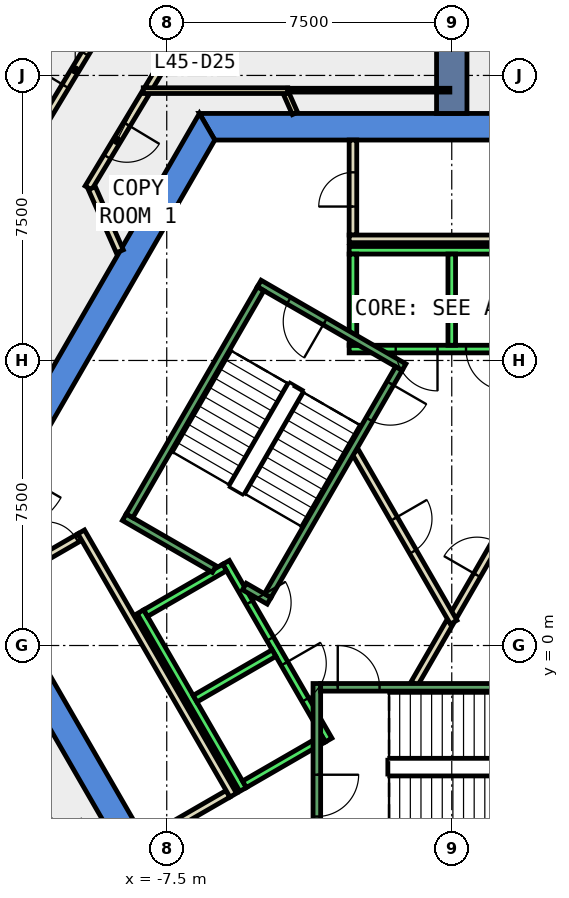
"""IFC4 building model, lengths in metres.
Left out: names, types, materials, properties, quantities, classifications, styles, units other than length and angle.
Written with IfcOpenShell. Run it as: python <this file> out.ifc"""

import sys

from ifc_helpers import new_model, si_unit, direction, frame, frame_2d, origin, place, context, subcontext, project, spatial, polyline, rectangle, outline, extrude, element, fill, save


model = new_model("IFC4")
c1 = context("Model", 3, precision=1e-05, world=origin(), true_north=direction((0.0, 1.0)))
c2 = subcontext(c1, "Body", "Model", "MODEL_VIEW")
j1 = project(units=[si_unit("LENGTHUNIT", "METRE"), si_unit("PLANEANGLEUNIT", "RADIAN")], contexts=[c1])
p1 = place(None, origin())
s1 = spatial("IfcSite", under=j1, at=p1, CompositionType="ELEMENT")
p2 = place(p1, origin())
s2 = spatial("IfcBuilding", under=s1, at=p2, CompositionType="ELEMENT")
p3 = place(p2, frame((0.0, 0.0, 202.4)))
s3 = spatial("IfcBuildingStorey", under=s2, at=p3, CompositionType="ELEMENT", Elevation=202.4)
p4 = place(p3, frame((0.0, 0.0, -0.4)))
e1 = element("IfcWall", 1, at=p4, inside=s3, PredefinedType="SHEAR", context=c2, shape_type="SweptSolid", body=[
    extrude(outline(polyline([(6.64, 14.0), (-6.64, 14.0), (-6.235, 13.3), (6.235, 13.3), (6.64, 14.0)])), origin(), (0.0, 0.0, 1.0), 4.2),
])
p5 = place(p3, frame((0.0, 0.0, -0.4)))
e2 = element("IfcWall", 2, at=p5, inside=s3, PredefinedType="SHEAR", context=c2, shape_type="SweptSolid", body=[
    extrude(outline(polyline([(-11.834, 5.002), (-11.228, 4.652), (-6.235, 13.3), (-6.64, 14.0), (-11.834, 5.002)])), origin(), (0.0, 0.0, 1.0), 4.2),
])
p6 = place(p3, frame((0.0, 0.0, -0.4)))
e3 = element("IfcWall", 3, at=p6, inside=s3, PredefinedType="SHEAR", context=c2, shape_type="SweptSolid", body=[
    extrude(outline(polyline([(-13.279, 2.5), (-6.64, -9.0), (-6.235, -8.3), (-12.471, 2.5), (-13.279, 2.5)])), origin(), (0.0, 0.0, 1.0), 4.2),
])
p7 = place(p3, frame((0.0, 14.0, -0.4), z_axis=(0.0, 0.0, 1.0), x_axis=(0.0, 1.0, 0.0)))
e4 = element("IfcWall", 4, at=p7, inside=s3, PredefinedType="SHEAR", context=c2, shape_type="SweptSolid", body=[
    extrude(rectangle(XDim=9.0, YDim=0.8, at=frame_2d((4.5, 0.0))), origin(), (0.0, 0.0, 1.0), 4.2),
])
p8 = place(p3, frame((-8.057, 14.536, 0.0), z_axis=(0.0, 0.0, 1.0), x_axis=(-0.516268010323, -0.856427078926, 0.0)))
e5 = element("IfcWall", 5, at=p8, inside=s3, PredefinedType="PARTITIONING", context=c2, shape_type="SweptSolid", body=[
    extrude(rectangle(XDim=2.915, YDim=0.2, at=frame_2d((1.458, 0.0))), origin(), (0.0, 0.0, 1.0), 3.8),
])
p9 = place(p8, frame((0.958, 0.0, 0.0)))
e6 = element("IfcOpeningElement", 6, at=p9, cuts=e5, PredefinedType="OPENING", context=c2, shape_type="SweptSolid", body=[
    extrude(rectangle(XDim=1.0, YDim=2.1, at=frame_2d((0.5, 1.05))), frame((0.0, 0.11, 0.0), z_axis=(0.0, -1.0, 0.0), x_axis=(1.0, 0.0, 0.0)), (0.0, 0.0, 1.0), 0.22),
])
p10 = place(p3, frame((-9.47, 12.033, 0.0), z_axis=(0.0, 0.0, 1.0), x_axis=(0.40441741061, -0.914574522931, 0.0)))
e7 = element("IfcWall", 7, at=p10, inside=s3, PredefinedType="PARTITIONING", context=c2, shape_type="SweptSolid", body=[
    extrude(rectangle(XDim=1.817, YDim=0.2, at=frame_2d((0.909, 0.0))), origin(), (0.0, 0.0, 1.0), 3.8),
])
p11 = place(p3, frame((-6.213, 17.595, 0.0), z_axis=(0.0, 0.0, 1.0), x_axis=(-0.516121112316, -0.856515614231, 0.0)))
e8 = element("IfcWall", 8, at=p11, inside=s3, PredefinedType="PARTITIONING", context=c2, shape_type="SweptSolid", body=[
    extrude(rectangle(XDim=3.422, YDim=0.2, at=frame_2d((1.711, 0.0))), origin(), (0.0, 0.0, 1.0), 3.8),
])
p12 = place(p3, frame((-12.025, 11.633, 0.0), z_axis=(0.0, 0.0, 1.0), x_axis=(0.516283129542, 0.856417964636, 0.0)))
e9 = element("IfcWall", 9, at=p12, inside=s3, PredefinedType="PARTITIONING", context=c2, shape_type="SweptSolid", body=[
    extrude(rectangle(XDim=8.05, YDim=0.2, at=frame_2d((4.025, 0.0))), origin(), (0.0, 0.0, 1.0), 3.8),
])
p13 = place(p12, frame((3.6, 0.0, 0.0)))
e10 = element("IfcOpeningElement", 10, at=p13, cuts=e9, PredefinedType="OPENING", context=c2, shape_type="SweptSolid", body=[
    extrude(rectangle(XDim=1.0, YDim=2.1, at=frame_2d((0.5, 1.05))), frame((0.0, 0.11, 0.0), z_axis=(0.0, -1.0, 0.0), x_axis=(1.0, 0.0, 0.0)), (0.0, 0.0, 1.0), 0.22),
])
p14 = place(p3, frame((-2.6, 10.8, 0.0), z_axis=(0.0, 0.0, 1.0), x_axis=(0.0, 1.0, 0.0)))
e11 = element("IfcWall", 11, at=p14, inside=s3, PredefinedType="PARTITIONING", context=c2, shape_type="SweptSolid", body=[
    extrude(rectangle(XDim=2.5, YDim=0.2, at=frame_2d((1.25, 0.0))), origin(), (0.0, 0.0, 1.0), 3.8),
])
p15 = place(p14, frame((0.75, 0.0, 0.0)))
e12 = element("IfcOpeningElement", 12, at=p15, cuts=e11, PredefinedType="OPENING", context=c2, shape_type="SweptSolid", body=[
    extrude(rectangle(XDim=0.9, YDim=2.1, at=frame_2d((0.45, 1.05))), frame((0.0, 0.11, 0.0), z_axis=(0.0, -1.0, 0.0), x_axis=(1.0, 0.0, 0.0)), (0.0, 0.0, 1.0), 0.22),
])
p16 = place(p3, frame((2.7, 10.7, 0.0), z_axis=(0.0, 0.0, 1.0), x_axis=(-1.0, 0.0, 0.0)))
e13 = element("IfcWall", 13, at=p16, inside=s3, PredefinedType="PARTITIONING", context=c2, shape_type="SweptSolid", body=[
    extrude(rectangle(XDim=5.4, YDim=0.2, at=frame_2d((2.7, 0.0))), origin(), (0.0, 0.0, 1.0), 3.8),
])
p17 = place(p3, frame((-5.888, -3.902, 0.0), z_axis=(0.0, 0.0, 1.0), x_axis=(-0.866022959057, -0.500004234368, 0.0)))
e14 = element("IfcWall", 14, at=p17, inside=s3, PredefinedType="PARTITIONING", context=c2, shape_type="SweptSolid", body=[
    extrude(rectangle(XDim=2.5, YDim=0.2, at=frame_2d((1.25, 0.0))), origin(), (0.0, 0.0, 1.0), 3.8),
])
p18 = place(p3, frame((-11.953, 1.603, 0.0), z_axis=(0.0, 0.0, 1.0), x_axis=(0.865998541277, 0.500046524342, 0.0)))
e15 = element("IfcWall", 15, at=p18, inside=s3, PredefinedType="PARTITIONING", context=c2, shape_type="SweptSolid", body=[
    extrude(rectangle(XDim=2.5, YDim=0.2, at=frame_2d((1.25, 0.0))), origin(), (0.0, 0.0, 1.0), 3.8),
])
p19 = place(p18, frame((1.5, 0.0, 0.0)))
e16 = element("IfcOpeningElement", 16, at=p19, cuts=e15, PredefinedType="OPENING", context=c2, shape_type="SweptSolid", body=[
    extrude(rectangle(XDim=0.9, YDim=2.1, at=frame_2d((0.45, 1.05))), frame((0.0, 0.11, 0.0), z_axis=(0.0, -1.0, 0.0), x_axis=(1.0, 0.0, 0.0)), (0.0, 0.0, 1.0), 0.22),
])
p20 = place(p3, frame((-9.751, 2.99, 0.0), z_axis=(0.0, 0.0, 1.0), x_axis=(0.500012163284, -0.866018381195, 0.0)))
e17 = element("IfcWall", 17, at=p20, inside=s3, PredefinedType="PARTITIONING", context=c2, shape_type="SweptSolid", body=[
    extrude(rectangle(XDim=8.0, YDim=0.2, at=frame_2d((4.0, 0.0))), origin(), (0.0, 0.0, 1.0), 3.8),
])
p21 = place(p3, frame((-4.125, 14.0, 0.0), z_axis=(0.0, 0.0, 1.0), x_axis=(-0.404850841056, 0.914382740703, 0.0)))
e18 = element("IfcWall", 18, at=p21, inside=s3, PredefinedType="PARTITIONING", context=c2, shape_type="SweptSolid", body=[
    extrude(rectangle(XDim=0.581, YDim=0.15, at=frame_2d((0.291, 0.0))), origin(), (0.0, 0.0, 1.0), 3.8),
])
p22 = place(p3, frame((-4.316, 14.6, 0.0), z_axis=(0.0, 0.0, 1.0), x_axis=(-1.0, 0.0, 0.0)))
e19 = element("IfcWall", 19, at=p22, inside=s3, PredefinedType="PARTITIONING", context=c2, shape_type="SweptSolid", body=[
    extrude(rectangle(XDim=3.802, YDim=0.15, at=frame_2d((1.901, 0.0))), origin(), (0.0, 0.0, 1.0), 3.8),
])
p23 = place(p3, frame((-0.982, -1.0, 0.0), z_axis=(0.0, 0.0, 1.0), x_axis=(0.50024047865, 0.865886518847, 0.0)))
e20 = element("IfcWall", 20, at=p23, inside=s3, PredefinedType="PARTITIONING", context=c2, shape_type="SweptSolid", body=[
    extrude(rectangle(XDim=1.863, YDim=0.2, at=frame_2d((0.931, 0.0))), origin(), (0.0, 0.0, 1.0), 3.8),
])
p24 = place(p3, frame((0.05, 0.787, 0.0), z_axis=(0.0, 0.0, 1.0), x_axis=(0.499954076797, 0.866051915934, 0.0)))
e21 = element("IfcWall", 21, at=p24, inside=s3, PredefinedType="PARTITIONING", context=c2, shape_type="SweptSolid", body=[
    extrude(rectangle(XDim=3.558, YDim=0.2, at=frame_2d((1.779, 0.0))), origin(), (0.0, 0.0, 1.0), 3.8),
])
p25 = place(p24, frame((1.229, 0.0, 0.0)))
e22 = element("IfcOpeningElement", 22, at=p25, cuts=e21, PredefinedType="OPENING", context=c2, shape_type="SweptSolid", body=[
    extrude(rectangle(XDim=1.0, YDim=2.1, at=frame_2d((0.5, 1.05))), frame((0.0, 0.11, 0.0), z_axis=(0.0, -1.0, 0.0), x_axis=(1.0, 0.0, 0.0)), (0.0, 0.0, 1.0), 0.22),
])
p26 = place(p3, frame((-2.54, 5.1, 0.0), z_axis=(0.0, 0.0, 1.0), x_axis=(0.499925051871, -0.866068670783, 0.0)))
e23 = element("IfcWall", 23, at=p26, inside=s3, PredefinedType="PARTITIONING", context=c2, shape_type="SweptSolid", body=[
    extrude(rectangle(XDim=5.181, YDim=0.2, at=frame_2d((2.59, 0.0))), origin(), (0.0, 0.0, 1.0), 3.8),
])
p27 = place(p26, frame((2.04, 0.0, 0.0)))
e24 = element("IfcOpeningElement", 24, at=p27, cuts=e23, PredefinedType="OPENING", context=c2, shape_type="SweptSolid", body=[
    extrude(rectangle(XDim=1.0, YDim=2.1, at=frame_2d((0.5, 1.05))), frame((0.0, 0.11, 0.0), z_axis=(0.0, -1.0, 0.0), x_axis=(1.0, 0.0, 0.0)), (0.0, 0.0, 1.0), 0.22),
])
p28 = place(p3, frame((-4.316, 14.612, 0.0), z_axis=(0.0, 0.0, 1.0), x_axis=(1.0, 0.0, 0.0)))
e25 = element("IfcWall", 25, at=p28, inside=s3, PredefinedType="PARTITIONING", context=c2, shape_type="SweptSolid", body=[
    extrude(rectangle(XDim=4.266, YDim=0.1, at=frame_2d((2.133, 0.0))), origin(), (0.0, 0.0, 1.0), 3.8),
])
p29 = place(p3, frame((-10.173, -5.069, 0.0), z_axis=(0.0, 0.0, 1.0), x_axis=(-0.725908697087, 0.687791075468, 0.0)))
e26 = element("IfcWall", 26, at=p29, inside=s3, PredefinedType="PARTITIONING", context=c2, shape_type="SweptSolid", body=[
    extrude(rectangle(XDim=8.313, YDim=0.2, at=frame_2d((4.157, 0.0))), origin(), (0.0, 0.0, 1.0), 3.8),
])
p30 = place(p3, frame((2.7, 7.8, 0.0), z_axis=(0.0, 0.0, 1.0), x_axis=(-1.0, 0.0, 0.0)))
e27 = element("IfcWall", 27, at=p30, inside=s3, PredefinedType="STANDARD", context=c2, shape_type="SweptSolid", body=[
    extrude(rectangle(XDim=5.4, YDim=0.2, at=frame_2d((2.7, 0.0))), origin(), (0.0, 0.0, 1.0), 3.8),
])
p31 = place(p30, frame((1.225, 0.0, 0.0)))
e28 = element("IfcOpeningElement", 28, at=p31, cuts=e27, PredefinedType="OPENING", context=c2, shape_type="SweptSolid", body=[
    extrude(rectangle(XDim=1.1, YDim=2.1, at=frame_2d((0.55, 1.05))), frame((0.0, 0.11, 0.0), z_axis=(0.0, -1.0, 0.0), x_axis=(1.0, 0.0, 0.0)), (0.0, 0.0, 1.0), 0.22),
])
p32 = place(p30, frame((3.075, 0.0, 0.0)))
e29 = element("IfcOpeningElement", 29, at=p32, cuts=e27, PredefinedType="OPENING", context=c2, shape_type="SweptSolid", body=[
    extrude(rectangle(XDim=1.1, YDim=2.1, at=frame_2d((0.55, 1.05))), frame((0.0, 0.11, 0.0), z_axis=(0.0, -1.0, 0.0), x_axis=(1.0, 0.0, 0.0)), (0.0, 0.0, 1.0), 0.22),
])
p33 = place(p3, frame((2.7, 10.4, 0.0), z_axis=(0.0, 0.0, 1.0), x_axis=(-1.0, 0.0, 0.0)))
e30 = element("IfcWall", 30, at=p33, inside=s3, PredefinedType="STANDARD", context=c2, shape_type="SweptSolid", body=[
    extrude(rectangle(XDim=5.4, YDim=0.2, at=frame_2d((2.7, 0.0))), origin(), (0.0, 0.0, 1.0), 3.8),
])
for number, where, z_axis, x_axis in (
    (31, (0.0, 7.9, 0.0), (0.0, 0.0, 1.0), (0.0, 1.0, 0.0)),
    (32, (-2.6, 7.9, 0.0), (0.0, 0.0, 1.0), (0.0, 1.0, 0.0)),
):
    element("IfcWall", number, at=place(p3, frame(where, z_axis=z_axis, x_axis=x_axis)), inside=s3, PredefinedType="STANDARD", context=c2, shape_type="SweptSolid", body=[
        extrude(rectangle(XDim=2.4, YDim=0.2, at=frame_2d((1.2, 0.0))), origin(), (0.0, 0.0, 1.0), 3.8),
    ])
p34 = place(p3, frame((-5.94, 2.188, 0.0), z_axis=(0.0, 0.0, 1.0), x_axis=(0.500034260056, -0.866005622828, 0.0)))
e33 = element("IfcWall", 33, at=p34, inside=s3, PredefinedType="STANDARD", context=c2, shape_type="SweptSolid", body=[
    extrude(rectangle(XDim=5.399, YDim=0.2, at=frame_2d((2.7, 0.0))), origin(), (0.0, 0.0, 1.0), 3.8),
])
p35 = place(p34, frame((3.075, 0.0, 0.0)))
e34 = element("IfcOpeningElement", 34, at=p35, cuts=e33, PredefinedType="OPENING", context=c2, shape_type="SweptSolid", body=[
    extrude(rectangle(XDim=1.1, YDim=2.1, at=frame_2d((0.55, 1.05))), frame((0.0, 0.11, 0.0), z_axis=(0.0, -1.0, 0.0), x_axis=(1.0, 0.0, 0.0)), (0.0, 0.0, 1.0), 0.22),
])
p36 = place(p34, frame((1.225, 0.0, 0.0)))
e35 = element("IfcOpeningElement", 35, at=p36, cuts=e33, PredefinedType="OPENING", context=c2, shape_type="SweptSolid", body=[
    extrude(rectangle(XDim=1.1, YDim=2.1, at=frame_2d((0.55, 1.05))), frame((0.0, 0.11, 0.0), z_axis=(0.0, -1.0, 0.0), x_axis=(1.0, 0.0, 0.0)), (0.0, 0.0, 1.0), 0.22),
])
p37 = place(p3, frame((-8.192, 0.888, 0.0), z_axis=(0.0, 0.0, 1.0), x_axis=(0.500034260056, -0.866005622828, 0.0)))
e36 = element("IfcWall", 36, at=p37, inside=s3, PredefinedType="STANDARD", context=c2, shape_type="SweptSolid", body=[
    extrude(rectangle(XDim=5.399, YDim=0.2, at=frame_2d((2.7, 0.0))), origin(), (0.0, 0.0, 1.0), 3.8),
])
for number, where, z_axis, x_axis in (
    (37, (-5.977, 2.052, 0.0), (0.0, 0.0, 1.0), (-0.866, -0.5, 0.0)),
    (38, (-4.677, -0.2, 0.0), (0.0, 0.0, 1.0), (-0.866, -0.5, 0.0)),
):
    element("IfcWall", number, at=place(p3, frame(where, z_axis=z_axis, x_axis=x_axis)), inside=s3, PredefinedType="STANDARD", context=c2, shape_type="SweptSolid", body=[
        extrude(rectangle(XDim=2.399, YDim=0.2, at=frame_2d((1.2, 0.0))), origin(), (0.0, 0.0, 1.0), 3.8),
    ])
p38 = place(p3, frame((-3.377, -2.452, 0.0), z_axis=(0.0, 0.0, 1.0), x_axis=(-0.865955154139, -0.50012165622, 0.0)))
e39 = element("IfcWall", 39, at=p38, inside=s3, PredefinedType="STANDARD", context=c2, shape_type="SweptSolid", body=[
    extrude(rectangle(XDim=2.4, YDim=0.2, at=frame_2d((1.2, 0.0))), origin(), (0.0, 0.0, 1.0), 3.8),
])
p39 = place(p3, frame((-3.55, -1.0, 0.0), z_axis=(0.0, 0.0, 1.0), x_axis=(0.0, -1.0, 0.0)))
e40 = element("IfcWall", 40, at=p39, inside=s3, PredefinedType="STANDARD", context=c2, shape_type="SweptSolid", body=[
    extrude(rectangle(XDim=4.4, YDim=0.2, at=frame_2d((2.2, 0.0))), origin(), (0.0, 0.0, 1.0), 3.8),
])
p40 = place(p39, frame((2.4, 0.0, 0.0)))
e41 = element("IfcOpeningElement", 41, at=p40, cuts=e40, PredefinedType="OPENING", context=c2, shape_type="SweptSolid", body=[
    extrude(rectangle(XDim=1.1, YDim=2.2, at=frame_2d((0.55, 1.1))), frame((0.0, 0.11, 0.0), z_axis=(0.0, -1.0, 0.0), x_axis=(1.0, 0.0, 0.0)), (0.0, 0.0, 1.0), 0.22),
])
p41 = place(p3, frame((-3.45, -1.1, 0.0), z_axis=(0.0, 0.0, 1.0), x_axis=(1.0, 0.0, 0.0)))
e42 = element("IfcWall", 42, at=p41, inside=s3, PredefinedType="STANDARD", context=c2, shape_type="SweptSolid", body=[
    extrude(rectangle(XDim=6.9, YDim=0.2, at=frame_2d((3.45, 0.0))), origin(), (0.0, 0.0, 1.0), 3.8),
])
p42 = place(p41, frame((0.45, 0.0, 0.0)))
e43 = element("IfcOpeningElement", 43, at=p42, cuts=e42, PredefinedType="OPENING", context=c2, shape_type="SweptSolid", body=[
    extrude(rectangle(XDim=1.1, YDim=2.2, at=frame_2d((0.55, 1.1))), frame((0.0, 0.11, 0.0), z_axis=(0.0, -1.0, 0.0), x_axis=(1.0, 0.0, 0.0)), (0.0, 0.0, 1.0), 0.22),
])
p43 = place(p3, frame((-1.256, 7.324, 0.0), z_axis=(0.0, 0.0, 1.0), x_axis=(-0.866046073146, 0.499964197906, 0.0)))
e44 = element("IfcWall", 44, at=p43, inside=s3, PredefinedType="STANDARD", context=c2, shape_type="SweptSolid", body=[
    extrude(rectangle(XDim=4.4, YDim=0.2, at=frame_2d((2.2, 0.0))), origin(), (0.0, 0.0, 1.0), 3.8),
])
p44 = place(p43, frame((2.4, 0.0, 0.0)))
e45 = element("IfcOpeningElement", 45, at=p44, cuts=e44, PredefinedType="OPENING", context=c2, shape_type="SweptSolid", body=[
    extrude(rectangle(XDim=1.1, YDim=2.2, at=frame_2d((0.55, 1.1))), frame((0.0, 0.11, 0.0), z_axis=(0.0, -1.0, 0.0), x_axis=(1.0, 0.0, 0.0)), (0.0, 0.0, 1.0), 0.22),
])
p45 = place(p3, frame((-6.25, 2.01, 0.0), z_axis=(0.0, 0.0, 1.0), x_axis=(-0.86611865017, 0.499838457731, 0.0)))
e46 = element("IfcWall", 46, at=p45, inside=s3, PredefinedType="STANDARD", context=c2, shape_type="SweptSolid", body=[
    extrude(rectangle(XDim=2.733, YDim=0.2, at=frame_2d((1.366, 0.0))), origin(), (0.0, 0.0, 1.0), 3.8),
])
p46 = place(p3, frame((-4.806, 1.176, 0.0), z_axis=(0.0, 0.0, 1.0), x_axis=(-0.866558586415, 0.499075361355, 0.0)))
e47 = element("IfcWall", 47, at=p46, inside=s3, PredefinedType="STANDARD", context=c2, shape_type="SweptSolid", body=[
    extrude(rectangle(XDim=0.751, YDim=0.2, at=frame_2d((0.376, 0.0))), origin(), (0.0, 0.0, 1.0), 3.8),
])
p47 = place(p3, frame((-1.393, 7.288, 0.0), z_axis=(0.0, 0.0, 1.0), x_axis=(-0.499963383562, -0.866046543262, 0.0)))
e48 = element("IfcWall", 48, at=p47, inside=s3, PredefinedType="STANDARD", context=c2, shape_type="SweptSolid", body=[
    extrude(rectangle(XDim=6.9, YDim=0.2, at=frame_2d((3.45, 0.0))), origin(), (0.0, 0.0, 1.0), 3.8),
])
p48 = place(p47, frame((0.45, 0.0, 0.0)))
e49 = element("IfcOpeningElement", 49, at=p48, cuts=e48, PredefinedType="OPENING", context=c2, shape_type="SweptSolid", body=[
    extrude(rectangle(XDim=1.1, YDim=2.2, at=frame_2d((0.55, 1.1))), frame((0.0, 0.11, 0.0), z_axis=(0.0, -1.0, 0.0), x_axis=(1.0, 0.0, 0.0)), (0.0, 0.0, 1.0), 0.22),
])
p49 = place(p3, frame((-5.03, 9.388, 0.0), z_axis=(0.0, 0.0, 1.0), x_axis=(-0.499978703459, -0.866037698999, 0.0)))
e50 = element("IfcWall", 50, at=p49, inside=s3, PredefinedType="STANDARD", context=c2, shape_type="SweptSolid", body=[
    extrude(rectangle(XDim=6.9, YDim=0.2, at=frame_2d((3.45, 0.0))), origin(), (0.0, 0.0, 1.0), 3.8),
])
p50 = place(p13, origin())
e51 = element("IfcDoor", 51, at=p50, inside=s3, OperationType="SINGLE_SWING_LEFT", PredefinedType="DOOR", context=c2, shape_type="SweptSolid", body=[
    extrude(rectangle(XDim=1.0, YDim=2.1, at=frame_2d((0.5, 1.05))), frame((0.0, 0.025, 0.0), z_axis=(0.0, -1.0, 0.0), x_axis=(1.0, 0.0, 0.0)), (0.0, 0.0, 1.0), 0.05),
])
fill(e10, e51)
p51 = place(p9, origin())
e52 = element("IfcDoor", 52, at=p51, inside=s3, OperationType="SINGLE_SWING_LEFT", PredefinedType="DOOR", context=c2, shape_type="SweptSolid", body=[
    extrude(rectangle(XDim=1.0, YDim=2.1, at=frame_2d((0.5, 1.05))), frame((0.0, 0.025, 0.0), z_axis=(0.0, -1.0, 0.0), x_axis=(1.0, 0.0, 0.0)), (0.0, 0.0, 1.0), 0.05),
])
fill(e6, e52)
p52 = place(p25, origin())
e53 = element("IfcDoor", 53, at=p52, inside=s3, OperationType="SINGLE_SWING_RIGHT", PredefinedType="DOOR", context=c2, shape_type="SweptSolid", body=[
    extrude(rectangle(XDim=1.0, YDim=2.1, at=frame_2d((0.5, 1.05))), frame((0.0, 0.025, 0.0), z_axis=(0.0, -1.0, 0.0), x_axis=(1.0, 0.0, 0.0)), (0.0, 0.0, 1.0), 0.05),
])
fill(e22, e53)
p53 = place(p27, origin())
e54 = element("IfcDoor", 54, at=p53, inside=s3, OperationType="SINGLE_SWING_RIGHT", PredefinedType="DOOR", context=c2, shape_type="SweptSolid", body=[
    extrude(rectangle(XDim=1.0, YDim=2.1, at=frame_2d((0.5, 1.05))), frame((0.0, 0.025, 0.0), z_axis=(0.0, -1.0, 0.0), x_axis=(1.0, 0.0, 0.0)), (0.0, 0.0, 1.0), 0.05),
])
fill(e24, e54)
p54 = place(p15, origin())
e55 = element("IfcDoor", 55, at=p54, inside=s3, OperationType="SINGLE_SWING_RIGHT", PredefinedType="DOOR", context=c2, shape_type="SweptSolid", body=[
    extrude(rectangle(XDim=0.9, YDim=2.1, at=frame_2d((0.45, 1.05))), frame((0.0, 0.025, 0.0), z_axis=(0.0, -1.0, 0.0), x_axis=(1.0, 0.0, 0.0)), (0.0, 0.0, 1.0), 0.05),
])
fill(e12, e55)
p55 = place(p19, origin())
e56 = element("IfcDoor", 56, at=p55, inside=s3, OperationType="SINGLE_SWING_LEFT", PredefinedType="DOOR", context=c2, shape_type="SweptSolid", body=[
    extrude(rectangle(XDim=0.9, YDim=2.1, at=frame_2d((0.45, 1.05))), frame((0.0, 0.025, 0.0), z_axis=(0.0, -1.0, 0.0), x_axis=(1.0, 0.0, 0.0)), (0.0, 0.0, 1.0), 0.05),
])
fill(e16, e56)
p56 = place(p31, origin())
e57 = element("IfcDoor", 57, at=p56, inside=s3, OperationType="SLIDING_TO_LEFT", PredefinedType="DOOR", context=c2, shape_type="SweptSolid", body=[
    extrude(rectangle(XDim=1.1, YDim=2.1, at=frame_2d((0.55, 1.05))), frame((0.0, 0.025, 0.0), z_axis=(0.0, -1.0, 0.0), x_axis=(1.0, 0.0, 0.0)), (0.0, 0.0, 1.0), 0.05),
])
fill(e28, e57)
p57 = place(p32, origin())
e58 = element("IfcDoor", 58, at=p57, inside=s3, OperationType="SLIDING_TO_LEFT", PredefinedType="DOOR", context=c2, shape_type="SweptSolid", body=[
    extrude(rectangle(XDim=1.1, YDim=2.1, at=frame_2d((0.55, 1.05))), frame((0.0, 0.025, 0.0), z_axis=(0.0, -1.0, 0.0), x_axis=(1.0, 0.0, 0.0)), (0.0, 0.0, 1.0), 0.05),
])
fill(e29, e58)
p58 = place(p35, origin())
e59 = element("IfcDoor", 59, at=p58, inside=s3, OperationType="SLIDING_TO_LEFT", PredefinedType="DOOR", context=c2, shape_type="SweptSolid", body=[
    extrude(rectangle(XDim=1.1, YDim=2.1, at=frame_2d((0.55, 1.05))), frame((0.0, 0.025, 0.0), z_axis=(0.0, -1.0, 0.0), x_axis=(1.0, 0.0, 0.0)), (0.0, 0.0, 1.0), 0.05),
])
fill(e34, e59)
p59 = place(p36, origin())
e60 = element("IfcDoor", 60, at=p59, inside=s3, OperationType="SLIDING_TO_LEFT", PredefinedType="DOOR", context=c2, shape_type="SweptSolid", body=[
    extrude(rectangle(XDim=1.1, YDim=2.1, at=frame_2d((0.55, 1.05))), frame((0.0, 0.025, 0.0), z_axis=(0.0, -1.0, 0.0), x_axis=(1.0, 0.0, 0.0)), (0.0, 0.0, 1.0), 0.05),
])
fill(e35, e60)
p60 = place(p42, origin())
e61 = element("IfcDoor", 61, at=p60, inside=s3, OperationType="SINGLE_SWING_LEFT", PredefinedType="DOOR", context=c2, shape_type="SweptSolid", body=[
    extrude(rectangle(XDim=1.1, YDim=2.2, at=frame_2d((0.55, 1.1))), frame((0.0, 0.025, 0.0), z_axis=(0.0, -1.0, 0.0), x_axis=(1.0, 0.0, 0.0)), (0.0, 0.0, 1.0), 0.05),
])
fill(e43, e61)
p61 = place(p40, origin())
e62 = element("IfcDoor", 62, at=p61, inside=s3, OperationType="SINGLE_SWING_LEFT", PredefinedType="DOOR", context=c2, shape_type="SweptSolid", body=[
    extrude(rectangle(XDim=1.1, YDim=2.2, at=frame_2d((0.55, 1.1))), frame((0.0, 0.025, 0.0), z_axis=(0.0, -1.0, 0.0), x_axis=(1.0, 0.0, 0.0)), (0.0, 0.0, 1.0), 0.05),
])
fill(e41, e62)
p62 = place(p48, origin())
e63 = element("IfcDoor", 63, at=p62, inside=s3, OperationType="SINGLE_SWING_LEFT", PredefinedType="DOOR", context=c2, shape_type="SweptSolid", body=[
    extrude(rectangle(XDim=1.1, YDim=2.2, at=frame_2d((0.55, 1.1))), frame((0.0, 0.025, 0.0), z_axis=(0.0, -1.0, 0.0), x_axis=(1.0, 0.0, 0.0)), (0.0, 0.0, 1.0), 0.05),
])
fill(e49, e63)
p63 = place(p44, origin())
e64 = element("IfcDoor", 64, at=p63, inside=s3, OperationType="SINGLE_SWING_LEFT", PredefinedType="DOOR", context=c2, shape_type="SweptSolid", body=[
    extrude(rectangle(XDim=1.1, YDim=2.2, at=frame_2d((0.55, 1.1))), frame((0.0, 0.025, 0.0), z_axis=(0.0, -1.0, 0.0), x_axis=(1.0, 0.0, 0.0)), (0.0, 0.0, 1.0), 0.05),
])
fill(e45, e64)
save(model, sys.argv[1])
